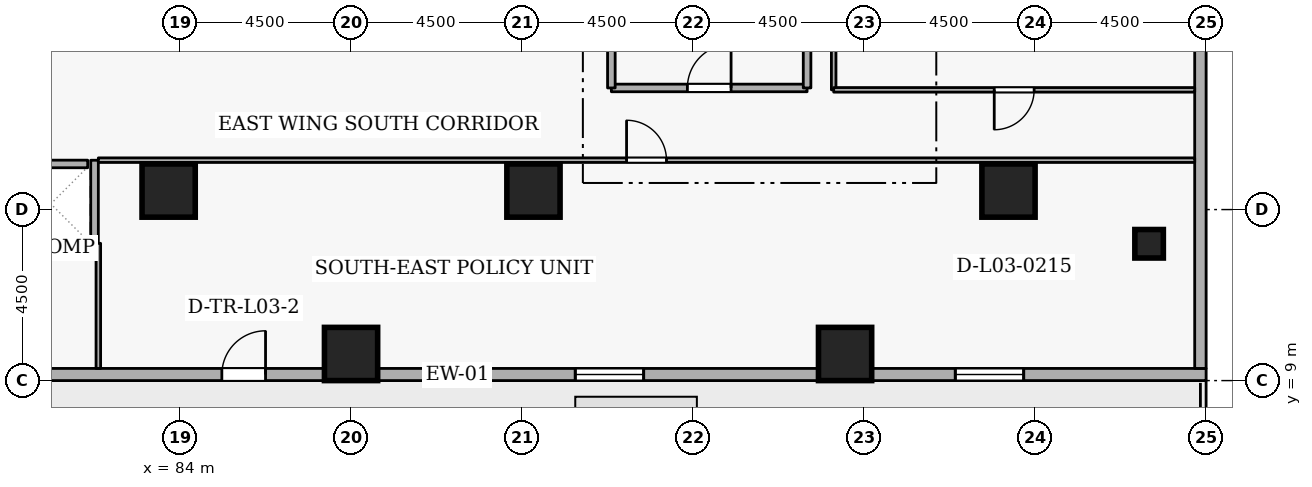
"""IFC4 building model, lengths in metres.
Left out: names, types, materials, properties, quantities, classifications, styles, units other than length and angle.
Written with IfcOpenShell. Run it as: python <this file> out.ifc"""

import sys

from ifc_helpers import new_model, si_unit, direction, frame, frame_2d, origin, origin_2d, place, context, subcontext, project, spatial, rectangle, extrude, element, fill, save


model = new_model("IFC4")
c1 = context("Model", 3, precision=1e-05, world=origin(), true_north=direction((0.0, 1.0)))
c2 = subcontext(c1, "Body", "Model", "MODEL_VIEW")
j1 = project(units=[si_unit("LENGTHUNIT", "METRE"), si_unit("PLANEANGLEUNIT", "RADIAN")], contexts=[c1])
p1 = place(None, origin())
s1 = spatial("IfcSite", under=j1, at=p1, CompositionType="ELEMENT")
p2 = place(p1, origin())
s2 = spatial("IfcBuilding", under=s1, at=p2, CompositionType="ELEMENT")
p3 = place(p2, frame((0.0, 0.0, 14.1)))
s3 = spatial("IfcBuildingStorey", under=s2, at=p3, CompositionType="ELEMENT", Elevation=14.1)
for number, where, z_axis, x_axis in (
    (1, (105.8, 14.0, 0.0), (0.0, 0.0, 1.0), (1.0, 0.0, 0.0)),
    (2, (101.5, 9.7, 0.0), (0.0, 0.0, 1.0), (1.0, 0.0, 0.0)),
    (3, (88.5, 9.7, 0.0), (0.0, 0.0, 1.0), (1.0, 0.0, 0.0)),
    (4, (93.3, 14.0, 0.0), (0.0, 0.0, 1.0), (1.0, 0.0, 0.0)),
    (5, (83.7, 14.0, 0.0), (0.0, 0.0, 1.0), (1.0, 0.0, 0.0)),
):
    element("IfcColumn", number, at=place(p3, frame(where, z_axis=z_axis, x_axis=x_axis)), inside=s3, PredefinedType="COLUMN", context=c2, shape_type="SweptSolid", body=[
        extrude(rectangle(XDim=1.4, YDim=1.4, at=origin_2d()), origin(), (0.0, 0.0, 1.0), 4.5),
    ])
p4 = place(p3, frame((109.5, 12.6, 0.0), z_axis=(0.0, 0.0, 1.0), x_axis=(1.0, 0.0, 0.0)))
e6 = element("IfcColumn", 6, at=p4, inside=s3, PredefinedType="COLUMN", context=c2, shape_type="SweptSolid", body=[
    extrude(rectangle(XDim=0.75, YDim=0.75, at=origin_2d()), origin(), (0.0, 0.0, 1.0), 4.5),
])
p5 = place(p3, frame((71.6, 9.16, 0.0), z_axis=(0.0, 0.0, 1.0), x_axis=(1.0, 0.0, 0.0)))
e7 = element("IfcWall", 7, at=p5, inside=s3, PredefinedType="STANDARD", context=c2, shape_type="SweptSolid", body=[
    extrude(rectangle(XDim=39.4, YDim=0.32, at=frame_2d((19.7, 0.0))), origin(), (0.0, 0.0, 1.0), 3.56),
])
p6 = place(p5, frame((13.5, 0.0, 0.0)))
e8 = element("IfcOpeningElement", 8, at=p6, cuts=e7, PredefinedType="OPENING", context=c2, shape_type="SweptSolid", body=[
    extrude(rectangle(XDim=1.15, YDim=2.1, at=frame_2d((0.575, 1.05))), frame((0.0, 0.17, 0.0), z_axis=(0.0, -1.0, 0.0), x_axis=(1.0, 0.0, 0.0)), (0.0, 0.0, 1.0), 0.34),
])
p7 = place(p5, frame((22.8, 0.0, 0.78)))
e9 = element("IfcOpeningElement", 9, at=p7, cuts=e7, PredefinedType="OPENING", context=c2, shape_type="SweptSolid", body=[
    extrude(rectangle(XDim=1.8, YDim=2.15, at=frame_2d((0.9, 1.075))), frame((0.0, 0.17, 0.0), z_axis=(0.0, -1.0, 0.0), x_axis=(1.0, 0.0, 0.0)), (0.0, 0.0, 1.0), 0.34),
])
p8 = place(p5, frame((32.8, 0.0, 0.78)))
e10 = element("IfcOpeningElement", 10, at=p8, cuts=e7, PredefinedType="OPENING", context=c2, shape_type="SweptSolid", body=[
    extrude(rectangle(XDim=1.8, YDim=2.15, at=frame_2d((0.9, 1.075))), frame((0.0, 0.17, 0.0), z_axis=(0.0, -1.0, 0.0), x_axis=(1.0, 0.0, 0.0)), (0.0, 0.0, 1.0), 0.34),
])
p9 = place(p3, frame((110.85, 9.32, 0.0), z_axis=(0.0, 0.0, 1.0), x_axis=(0.0, 1.0, 0.0)))
e11 = element("IfcWall", 11, at=p9, inside=s3, PredefinedType="STANDARD", context=c2, shape_type="SweptSolid", body=[
    extrude(rectangle(XDim=39.86, YDim=0.3, at=frame_2d((19.93, 0.0))), origin(), (0.0, 0.0, 1.0), 3.56),
])
p10 = place(p3, frame((79.63, 14.7, 0.0), z_axis=(0.0, 0.0, 1.0), x_axis=(1.0, 0.0, 0.0)))
e12 = element("IfcWall", 12, at=p10, inside=s3, PredefinedType="STANDARD", context=c2, shape_type="SweptSolid", body=[
    extrude(rectangle(XDim=1.94, YDim=0.2, at=frame_2d((0.97, 0.0))), origin(), (0.0, 0.0, 1.0), 4.16),
])
p11 = place(p3, frame((79.452, 12.5, 0.0), z_axis=(0.0, 0.0, 1.0), x_axis=(1.0, 0.0, 0.0)))
e13 = element("IfcWall", 13, at=p11, inside=s3, PredefinedType="STANDARD", context=c2, shape_type="SweptSolid", body=[
    extrude(rectangle(XDim=2.296, YDim=0.2, at=frame_2d((1.148, 0.0))), origin(), (0.0, 0.0, 1.0), 4.16),
])
p12 = place(p3, frame((81.75, 12.612, 0.0), z_axis=(0.0, 0.0, 1.0), x_axis=(0.0, 1.0, 0.0)))
e14 = element("IfcWall", 14, at=p12, inside=s3, PredefinedType="STANDARD", context=c2, shape_type="SweptSolid", body=[
    extrude(rectangle(XDim=2.186, YDim=0.2, at=frame_2d((1.093, 0.0))), origin(), (0.0, 0.0, 1.0), 4.16),
])
p13 = place(p3, frame((95.35, 16.7, 0.0), z_axis=(0.0, 0.0, 1.0), x_axis=(1.0, 0.0, 0.0)))
e15 = element("IfcWall", 15, at=p13, inside=s3, PredefinedType="STANDARD", context=c2, shape_type="SweptSolid", body=[
    extrude(rectangle(XDim=5.15, YDim=0.2, at=frame_2d((2.575, 0.0))), origin(), (0.0, 0.0, 1.0), 4.16),
])
p14 = place(p13, frame((2.0, 0.0, 0.0)))
e16 = element("IfcOpeningElement", 16, at=p14, cuts=e15, PredefinedType="OPENING", context=c2, shape_type="SweptSolid", body=[
    extrude(rectangle(XDim=1.15, YDim=2.1, at=frame_2d((0.575, 1.05))), frame((0.0, 0.11, 0.0), z_axis=(0.0, -1.0, 0.0), x_axis=(1.0, 0.0, 0.0)), (0.0, 0.0, 1.0), 0.22),
])
for number, where, z_axis, x_axis in (
    (17, (100.5, 16.7, 0.0), (0.0, 0.0, 1.0), (0.0, 1.0, 0.0)),
    (18, (95.35, 19.2, 0.0), (0.0, 0.0, 1.0), (0.0, -1.0, 0.0)),
):
    element("IfcWall", number, at=place(p3, frame(where, z_axis=z_axis, x_axis=x_axis)), inside=s3, PredefinedType="STANDARD", context=c2, shape_type="SweptSolid", body=[
        extrude(rectangle(XDim=2.5, YDim=0.2, at=frame_2d((1.25, 0.0))), origin(), (0.0, 0.0, 1.0), 4.16),
    ])
p15 = place(p3, frame((101.2, 16.65, 0.0), z_axis=(0.0, 0.0, 1.0), x_axis=(0.0, 1.0, 0.0)))
e19 = element("IfcWall", 19, at=p15, inside=s3, PredefinedType="PARTITIONING", context=c2, shape_type="SweptSolid", body=[
    extrude(rectangle(XDim=10.35, YDim=0.12, at=frame_2d((5.175, 0.0))), origin(), (0.0, 0.0, 1.0), 4.16),
])
p16 = place(p3, frame((110.7, 16.65, 0.0), z_axis=(0.0, 0.0, 1.0), x_axis=(-1.0, 0.0, 0.0)))
e20 = element("IfcWall", 20, at=p16, inside=s3, PredefinedType="PARTITIONING", context=c2, shape_type="SweptSolid", body=[
    extrude(rectangle(XDim=9.5, YDim=0.12, at=frame_2d((4.75, 0.0))), origin(), (0.0, 0.0, 1.0), 4.16),
])
p17 = place(p16, frame((4.225, 0.0, 0.0)))
e21 = element("IfcOpeningElement", 21, at=p17, cuts=e20, PredefinedType="OPENING", context=c2, shape_type="SweptSolid", body=[
    extrude(rectangle(XDim=1.05, YDim=2.1, at=frame_2d((0.525, 1.05))), frame((0.0, 0.07, 0.0), z_axis=(0.0, -1.0, 0.0), x_axis=(1.0, 0.0, 0.0)), (0.0, 0.0, 1.0), 0.14),
])
p18 = place(p3, frame((81.85, 9.32, 0.0), z_axis=(0.0, 0.0, 1.0), x_axis=(0.0, 1.0, 0.0)))
e22 = element("IfcWall", 22, at=p18, inside=s3, PredefinedType="PARTITIONING", context=c2, shape_type="SweptSolid", body=[
    extrude(rectangle(XDim=3.292, YDim=0.12, at=frame_2d((1.646, 0.0))), origin(), (0.0, 0.0, 1.0), 4.16),
])
p19 = place(p3, frame((81.85, 14.8, 0.0), z_axis=(0.0, 0.0, 1.0), x_axis=(1.0, 0.0, 0.0)))
e23 = element("IfcWall", 23, at=p19, inside=s3, PredefinedType="PARTITIONING", context=c2, shape_type="SweptSolid", body=[
    extrude(rectangle(XDim=28.85, YDim=0.12, at=frame_2d((14.425, 0.0))), origin(), (0.0, 0.0, 1.0), 4.16),
])
p20 = place(p19, frame((13.9, 0.0, 0.0)))
e24 = element("IfcOpeningElement", 24, at=p20, cuts=e23, PredefinedType="OPENING", context=c2, shape_type="SweptSolid", body=[
    extrude(rectangle(XDim=1.05, YDim=2.1, at=frame_2d((0.525, 1.05))), frame((0.0, 0.07, 0.0), z_axis=(0.0, -1.0, 0.0), x_axis=(1.0, 0.0, 0.0)), (0.0, 0.0, 1.0), 0.14),
])
p21 = place(p6, origin())
e25 = element("IfcDoor", 25, at=p21, inside=s3, OperationType="SINGLE_SWING_RIGHT", PredefinedType="DOOR", context=c2, shape_type="SweptSolid", body=[
    extrude(rectangle(XDim=1.15, YDim=2.1, at=frame_2d((0.575, 1.05))), frame((0.0, 0.025, 0.0), z_axis=(0.0, -1.0, 0.0), x_axis=(1.0, 0.0, 0.0)), (0.0, 0.0, 1.0), 0.05),
])
fill(e8, e25)
p22 = place(p7, origin())
e26 = element("IfcWindow", 26, at=p22, inside=s3, PartitioningType="SINGLE_PANEL", PredefinedType="WINDOW", context=c2, shape_type="SweptSolid", body=[
    extrude(rectangle(XDim=1.8, YDim=2.15, at=frame_2d((0.9, 1.075))), frame((0.0, 0.03, 0.0), z_axis=(0.0, -1.0, 0.0), x_axis=(1.0, 0.0, 0.0)), (0.0, 0.0, 1.0), 0.06),
])
fill(e9, e26)
p23 = place(p8, origin())
e27 = element("IfcWindow", 27, at=p23, inside=s3, PartitioningType="SINGLE_PANEL", PredefinedType="WINDOW", context=c2, shape_type="SweptSolid", body=[
    extrude(rectangle(XDim=1.8, YDim=2.15, at=frame_2d((0.9, 1.075))), frame((0.0, 0.03, 0.0), z_axis=(0.0, -1.0, 0.0), x_axis=(1.0, 0.0, 0.0)), (0.0, 0.0, 1.0), 0.06),
])
fill(e10, e27)
p24 = place(p14, origin())
e28 = element("IfcDoor", 28, at=p24, inside=s3, OperationType="SINGLE_SWING_RIGHT", PredefinedType="DOOR", context=c2, shape_type="SweptSolid", body=[
    extrude(rectangle(XDim=1.15, YDim=2.1, at=frame_2d((0.575, 1.05))), frame((0.0, 0.025, 0.0), z_axis=(0.0, -1.0, 0.0), x_axis=(1.0, 0.0, 0.0)), (0.0, 0.0, 1.0), 0.05),
])
fill(e16, e28)
p25 = place(p17, origin())
e29 = element("IfcDoor", 29, at=p25, inside=s3, OperationType="SINGLE_SWING_RIGHT", PredefinedType="DOOR", context=c2, shape_type="SweptSolid", body=[
    extrude(rectangle(XDim=1.05, YDim=2.1, at=frame_2d((0.525, 1.05))), frame((0.0, 0.025, 0.0), z_axis=(0.0, -1.0, 0.0), x_axis=(1.0, 0.0, 0.0)), (0.0, 0.0, 1.0), 0.05),
])
fill(e21, e29)
p26 = place(p20, origin())
e30 = element("IfcDoor", 30, at=p26, inside=s3, OperationType="SINGLE_SWING_LEFT", PredefinedType="DOOR", context=c2, shape_type="SweptSolid", body=[
    extrude(rectangle(XDim=1.05, YDim=2.1, at=frame_2d((0.525, 1.05))), frame((0.0, 0.025, 0.0), z_axis=(0.0, -1.0, 0.0), x_axis=(1.0, 0.0, 0.0)), (0.0, 0.0, 1.0), 0.05),
])
fill(e24, e30)
save(model, sys.argv[1])
